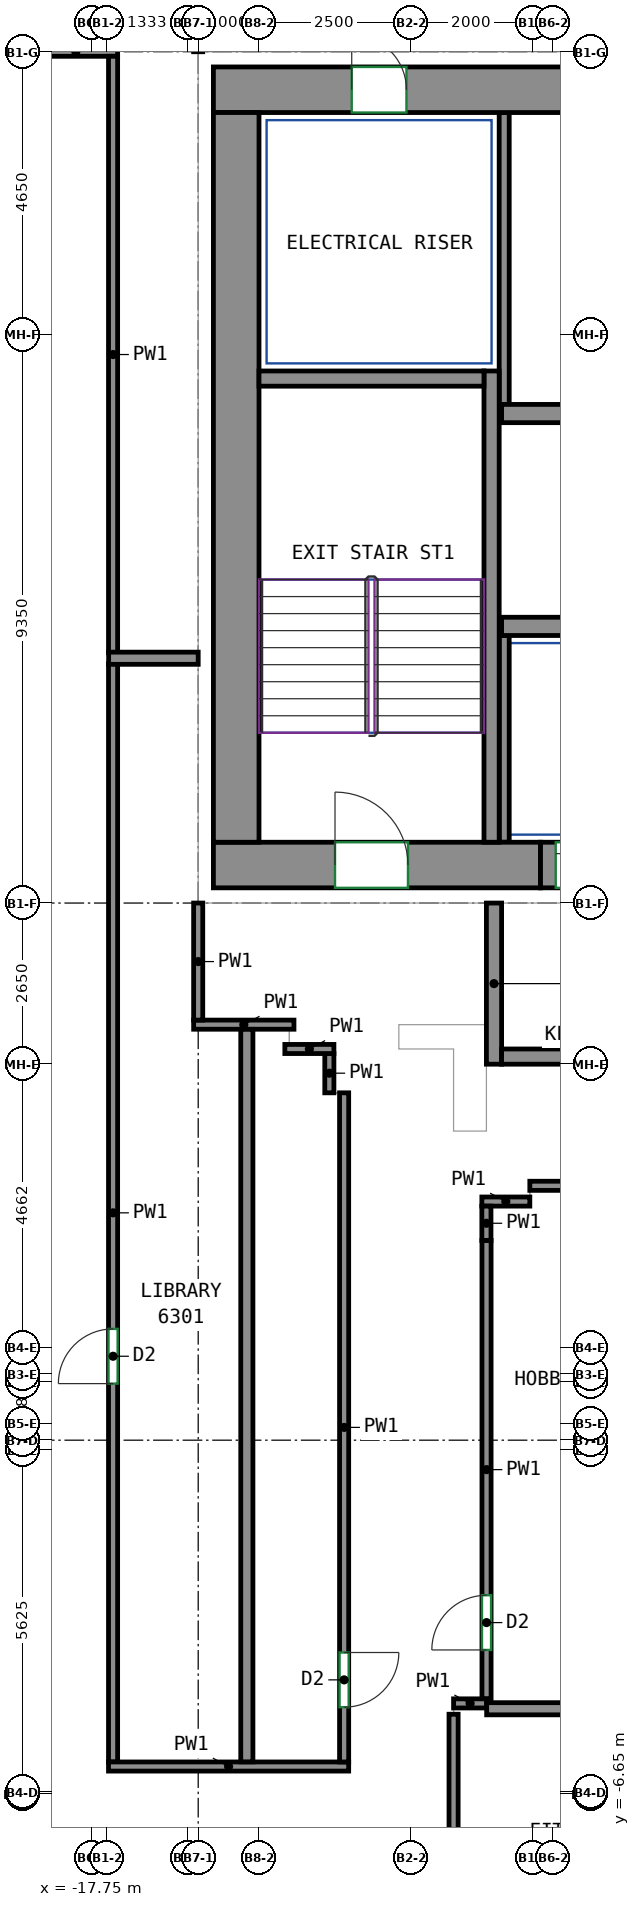
"""IFC4 building model, lengths in metres.
Left out: names, types, materials, properties, quantities, classifications, styles, units other than length and angle.
Written with IfcOpenShell. Run it as: python <this file> out.ifc"""

import sys

from ifc_helpers import new_model, si_unit, direction, frame, frame_2d, origin, place, context, subcontext, project, spatial, rectangle, extrude, source, transform, mapped, element, fill, save


model = new_model("IFC4")
c1 = context("Model", 3, precision=1e-05, world=origin(), true_north=direction((0.0, 1.0)))
c2 = subcontext(c1, "Body", "Model", "MODEL_VIEW")
j1 = project(units=[si_unit("LENGTHUNIT", "METRE"), si_unit("PLANEANGLEUNIT", "RADIAN")], contexts=[c1])
p1 = place(None, origin())
s1 = spatial("IfcSite", under=j1, at=p1, CompositionType="ELEMENT")
p2 = place(p1, origin())
s2 = spatial("IfcBuilding", under=s1, at=p2, CompositionType="ELEMENT")
p3 = place(p2, frame((0.0, 0.0, 259.4)))
s3 = spatial("IfcBuildingStorey", under=s2, at=p3, CompositionType="ELEMENT", Elevation=259.4)
m1 = source(origin(), c2, "Body", "SweptSolid", [
    extrude(rectangle(XDim=5.38, YDim=0.75, at=frame_2d((2.69, 0.0))), origin(), (0.0, 0.0, 1.0), 3.0),
])
p4 = place(p3, frame((-15.75, 8.625, 0.0), z_axis=(0.0, 0.0, 1.0), x_axis=(1.0, 0.0, 0.0)))
e1 = element("IfcWall", 1, at=p4, inside=s3, PredefinedType="SHEAR", context=c2, shape_type="MappedRepresentation", body=[
    mapped(m1, transform((0.0, 0.0, 0.0))),
])
p5 = place(p4, frame((2.0, 0.0, 0.0)))
e2 = element("IfcOpeningElement", 2, at=p5, cuts=e1, PredefinedType="OPENING", context=c2, shape_type="SweptSolid", body=[
    extrude(rectangle(XDim=1.2, YDim=2.1, at=frame_2d((0.6, 1.05))), frame((0.0, 0.385, 0.0), z_axis=(0.0, -1.0, 0.0), x_axis=(1.0, 0.0, 0.0)), (0.0, 0.0, 1.0), 0.77),
])
m2 = source(origin(), c2, "Body", "SweptSolid", [
    extrude(rectangle(XDim=33.6, YDim=0.75, at=frame_2d((16.8, 0.0))), origin(), (0.0, 0.0, 1.0), 3.0),
])
p6 = place(p3, frame((-15.75, 21.375, 0.0), z_axis=(0.0, 0.0, 1.0), x_axis=(1.0, 0.0, 0.0)))
e3 = element("IfcWall", 3, at=p6, inside=s3, PredefinedType="SHEAR", context=c2, shape_type="MappedRepresentation", body=[
    mapped(m2, transform((0.0, 0.0, 0.0))),
])
p7 = place(p6, frame((8.27, 0.0, 0.0)))
e4 = element("IfcOpeningElement", 4, at=p7, cuts=e3, PredefinedType="OPENING", context=c2, shape_type="SweptSolid", body=[
    extrude(rectangle(XDim=0.9, YDim=2.1, at=frame_2d((0.45, 1.05))), frame((0.0, 0.385, 0.0), z_axis=(0.0, -1.0, 0.0), x_axis=(1.0, 0.0, 0.0)), (0.0, 0.0, 1.0), 0.77),
])
p8 = place(p6, frame((14.3, 0.0, 0.0)))
e5 = element("IfcOpeningElement", 5, at=p8, cuts=e3, PredefinedType="OPENING", context=c2, shape_type="SweptSolid", body=[
    extrude(rectangle(XDim=0.9, YDim=2.1, at=frame_2d((0.45, 1.05))), frame((0.0, 0.385, 0.0), z_axis=(0.0, -1.0, 0.0), x_axis=(1.0, 0.0, 0.0)), (0.0, 0.0, 1.0), 0.77),
])
p9 = place(p6, frame((19.124, 0.0, 0.0)))
e6 = element("IfcOpeningElement", 6, at=p9, cuts=e3, PredefinedType="OPENING", context=c2, shape_type="SweptSolid", body=[
    extrude(rectangle(XDim=0.9, YDim=2.1, at=frame_2d((0.45, 1.05))), frame((0.0, 0.385, 0.0), z_axis=(0.0, -1.0, 0.0), x_axis=(1.0, 0.0, 0.0)), (0.0, 0.0, 1.0), 0.77),
])
p10 = place(p6, frame((23.814, 0.0, 0.0)))
e7 = element("IfcOpeningElement", 7, at=p10, cuts=e3, PredefinedType="OPENING", context=c2, shape_type="SweptSolid", body=[
    extrude(rectangle(XDim=0.9, YDim=2.1, at=frame_2d((0.45, 1.05))), frame((0.0, 0.385, 0.0), z_axis=(0.0, -1.0, 0.0), x_axis=(1.0, 0.0, 0.0)), (0.0, 0.0, 1.0), 0.77),
])
p11 = place(p6, frame((27.07, 0.0, 0.0)))
e8 = element("IfcOpeningElement", 8, at=p11, cuts=e3, PredefinedType="OPENING", context=c2, shape_type="SweptSolid", body=[
    extrude(rectangle(XDim=0.9, YDim=2.1, at=frame_2d((0.45, 1.05))), frame((0.0, 0.385, 0.0), z_axis=(0.0, -1.0, 0.0), x_axis=(1.0, 0.0, 0.0)), (0.0, 0.0, 1.0), 0.77),
])
p12 = place(p6, frame((2.275, 0.0, 0.0)))
e9 = element("IfcOpeningElement", 9, at=p12, cuts=e3, PredefinedType="OPENING", context=c2, shape_type="SweptSolid", body=[
    extrude(rectangle(XDim=0.9, YDim=2.1, at=frame_2d((0.45, 1.05))), frame((0.0, 0.385, 0.0), z_axis=(0.0, -1.0, 0.0), x_axis=(1.0, 0.0, 0.0)), (0.0, 0.0, 1.0), 0.77),
])
p13 = place(p6, frame((30.425, 0.0, 0.0)))
e10 = element("IfcOpeningElement", 10, at=p13, cuts=e3, PredefinedType="OPENING", context=c2, shape_type="SweptSolid", body=[
    extrude(rectangle(XDim=0.9, YDim=2.1, at=frame_2d((0.45, 1.05))), frame((0.0, 0.385, 0.0), z_axis=(0.0, -1.0, 0.0), x_axis=(1.0, 0.0, 0.0)), (0.0, 0.0, 1.0), 0.77),
])
m3 = source(origin(), c2, "Body", "SweptSolid", [
    extrude(rectangle(XDim=12.0, YDim=0.75, at=frame_2d((6.0, 0.0))), origin(), (0.0, 0.0, 1.0), 3.0),
])
p14 = place(p3, frame((-15.375, 9.0, 0.0), z_axis=(0.0, 0.0, 1.0), x_axis=(0.0, 1.0, 0.0)))
e11 = element("IfcWall", 11, at=p14, inside=s3, PredefinedType="SHEAR", context=c2, shape_type="MappedRepresentation", body=[
    mapped(m3, transform((0.0, 0.0, 0.0))),
])
m4 = source(origin(), c2, "Body", "SweptSolid", [
    extrude(rectangle(XDim=7.75, YDim=0.25, at=frame_2d((3.875, 0.0))), origin(), (0.0, 0.0, 1.0), 3.0),
])
p15 = place(p3, frame((-11.175, 9.0, 0.0), z_axis=(0.0, 0.0, 1.0), x_axis=(0.0, 1.0, 0.0)))
e12 = element("IfcWall", 12, at=p15, inside=s3, PredefinedType="SHEAR", context=c2, shape_type="MappedRepresentation", body=[
    mapped(m4, transform((0.0, 0.0, 0.0))),
])
m5 = source(origin(), c2, "Body", "SweptSolid", [
    extrude(rectangle(XDim=3.7, YDim=0.25, at=frame_2d((1.85, 0.0))), origin(), (0.0, 0.0, 1.0), 3.0),
])
p16 = place(p3, frame((-15.0, 16.625, 0.0), z_axis=(0.0, 0.0, 1.0), x_axis=(1.0, 0.0, 0.0)))
e13 = element("IfcWall", 13, at=p16, inside=s3, PredefinedType="SHEAR", context=c2, shape_type="MappedRepresentation", body=[
    mapped(m5, transform((0.0, 0.0, 0.0))),
])
m6 = source(origin(), c2, "Body", "SweptSolid", [
    extrude(rectangle(XDim=6.0, YDim=0.3, at=frame_2d((3.0, 0.0))), origin(), (0.0, 0.0, 1.0), 3.0),
])
p17 = place(p3, frame((-11.01, 12.55, 0.0), z_axis=(0.0, 0.0, 1.0), x_axis=(1.0, 0.0, 0.0)))
e14 = element("IfcWall", 14, at=p17, inside=s3, PredefinedType="SHEAR", context=c2, shape_type="MappedRepresentation", body=[
    mapped(m6, transform((0.0, 0.0, 0.0))),
])
m7 = source(origin(), c2, "Body", "SweptSolid", [
    extrude(rectangle(XDim=22.08, YDim=0.3, at=frame_2d((11.04, 0.0))), origin(), (0.0, 0.0, 1.0), 3.0),
])
p18 = place(p3, frame((-11.01, 16.05, 0.0), z_axis=(0.0, 0.0, 1.0), x_axis=(1.0, 0.0, 0.0)))
e15 = element("IfcWall", 15, at=p18, inside=s3, PredefinedType="SHEAR", context=c2, shape_type="MappedRepresentation", body=[
    mapped(m7, transform((0.0, 0.0, 0.0))),
])
m8 = source(origin(), c2, "Body", "SweptSolid", [
    extrude(rectangle(XDim=2.65, YDim=0.25, at=frame_2d((1.325, 0.0))), origin(), (0.0, 0.0, 1.0), 2.45),
])
p19 = place(p3, frame((-11.135, 5.35, 0.0), z_axis=(0.0, 0.0, 1.0), x_axis=(0.0, 1.0, 0.0)))
e16 = element("IfcWall", 16, at=p19, inside=s3, PredefinedType="PARTITIONING", context=c2, shape_type="MappedRepresentation", body=[
    mapped(m8, transform((0.0, 0.0, 0.0))),
])
m9 = source(origin(), c2, "Body", "SweptSolid", [
    extrude(rectangle(XDim=5.36, YDim=0.25, at=frame_2d((2.68, 0.0))), origin(), (0.0, 0.0, 1.0), 3.0),
])
p20 = place(p3, frame((-11.01, 5.475, 0.0), z_axis=(0.0, 0.0, 1.0), x_axis=(1.0, 0.0, 0.0)))
e17 = element("IfcWall", 17, at=p20, inside=s3, PredefinedType="PARTITIONING", context=c2, shape_type="MappedRepresentation", body=[
    mapped(m9, transform((0.0, 0.0, 0.0))),
])
p21 = place(p20, frame((2.28, 0.0, 0.0)))
e18 = element("IfcOpeningElement", 18, at=p21, cuts=e17, PredefinedType="OPENING", context=c2, shape_type="SweptSolid", body=[
    extrude(rectangle(XDim=0.8, YDim=2.0, at=frame_2d((0.4, 1.0))), frame((0.0, 0.135, 0.0), z_axis=(0.0, -1.0, 0.0), x_axis=(1.0, 0.0, 0.0)), (0.0, 0.0, 1.0), 0.27),
])
m10 = source(origin(), c2, "Body", "SweptSolid", [
    extrude(rectangle(XDim=4.8, YDim=0.165, at=frame_2d((2.4, 0.0))), origin(), (0.0, 0.0, 1.0), 3.0),
])
p22 = place(p3, frame((-10.968, 16.2, 0.0), z_axis=(0.0, 0.0, 1.0), x_axis=(0.0, 1.0, 0.0)))
e19 = element("IfcWall", 19, at=p22, inside=s3, PredefinedType="PARTITIONING", context=c2, shape_type="MappedRepresentation", body=[
    mapped(m10, transform((0.0, 0.0, 0.0))),
])
m11 = source(origin(), c2, "Body", "SweptSolid", [
    extrude(rectangle(XDim=3.4, YDim=0.165, at=frame_2d((1.7, 0.0))), origin(), (0.0, 0.0, 1.0), 3.0),
])
p23 = place(p3, frame((-10.968, 9.0, 0.0), z_axis=(0.0, 0.0, 1.0), x_axis=(0.0, 1.0, 0.0)))
e20 = element("IfcWall", 20, at=p23, inside=s3, PredefinedType="PARTITIONING", context=c2, shape_type="MappedRepresentation", body=[
    mapped(m11, transform((0.0, 0.0, 0.0))),
])
m12 = source(origin(), c2, "Body", "SweptSolid", [
    extrude(rectangle(XDim=1.4, YDim=0.75, at=frame_2d((0.7, 0.0))), origin(), (0.0, 0.0, 1.0), 2.7),
])
p24 = place(p3, frame((-10.37, 8.625, 0.0), z_axis=(0.0, 0.0, 1.0), x_axis=(1.0, 0.0, 0.0)))
e21 = element("IfcWall", 21, at=p24, inside=s3, PredefinedType="PARTITIONING", context=c2, shape_type="MappedRepresentation", body=[
    mapped(m12, transform((0.0, 0.0, 0.0))),
])
p25 = place(p24, frame((0.25, 0.0, 0.0)))
e22 = element("IfcOpeningElement", 22, at=p25, cuts=e21, PredefinedType="OPENING", context=c2, shape_type="SweptSolid", body=[
    extrude(rectangle(XDim=0.9, YDim=2.1, at=frame_2d((0.45, 1.05))), frame((0.0, 0.385, 0.0), z_axis=(0.0, -1.0, 0.0), x_axis=(1.0, 0.0, 0.0)), (0.0, 0.0, 1.0), 0.77),
])
p26 = place(p3, frame((-17.4, -6.125, 0.0), z_axis=(0.0, 0.0, 1.0), x_axis=(0.0, 1.0, 0.0)))
e23 = element("IfcWall", 23, at=p26, inside=s3, PredefinedType="PARTITIONING", context=c2, shape_type="SweptSolid", body=[
    extrude(rectangle(XDim=18.061, YDim=0.15, at=frame_2d((9.031, 0.0))), origin(), (0.0, 0.0, 1.0), 3.0),
])
p27 = place(p26, frame((6.222, 0.0, 0.0)))
e24 = element("IfcOpeningElement", 24, at=p27, cuts=e23, PredefinedType="OPENING", context=c2, shape_type="SweptSolid", body=[
    extrude(rectangle(XDim=0.9, YDim=2.1, at=frame_2d((0.45, 1.05))), frame((0.0, 0.085, 0.0), z_axis=(0.0, -1.0, 0.0), x_axis=(1.0, 0.0, 0.0)), (0.0, 0.0, 1.0), 0.17),
])
p28 = place(p3, frame((-17.475, -6.2, 0.0), z_axis=(0.0, 0.0, 1.0), x_axis=(1.0, 0.0, 0.0)))
e25 = element("IfcWall", 25, at=p28, inside=s3, PredefinedType="PARTITIONING", context=c2, shape_type="SweptSolid", body=[
    extrude(rectangle(XDim=3.95, YDim=0.15, at=frame_2d((1.975, 0.0))), origin(), (0.0, 0.0, 1.0), 3.0),
])
p29 = place(p3, frame((-16.075, 6.0, 0.0), z_axis=(0.0, 0.0, 1.0), x_axis=(1.0, 0.0, 0.0)))
e26 = element("IfcWall", 26, at=p29, inside=s3, PredefinedType="PARTITIONING", context=c2, shape_type="SweptSolid", body=[
    extrude(rectangle(XDim=1.65, YDim=0.15, at=frame_2d((0.825, 0.0))), origin(), (0.0, 0.0, 1.0), 3.0),
])
p30 = place(p3, frame((-16.0, 6.075, 0.0), z_axis=(0.0, 0.0, 1.0), x_axis=(0.0, 1.0, 0.0)))
e27 = element("IfcWall", 27, at=p30, inside=s3, PredefinedType="PARTITIONING", context=c2, shape_type="SweptSolid", body=[
    extrude(rectangle(XDim=1.925, YDim=0.15, at=frame_2d((0.962, 0.0))), origin(), (0.0, 0.0, 1.0), 3.0),
])
p31 = place(p3, frame((-17.325, 22.0, 0.0), z_axis=(0.0, 0.0, 1.0), x_axis=(-1.0, 0.0, 0.0)))
e28 = element("IfcWall", 28, at=p31, inside=s3, PredefinedType="PARTITIONING", context=c2, shape_type="SweptSolid", body=[
    extrude(rectangle(XDim=1.375, YDim=0.15, at=frame_2d((0.688, 0.0))), origin(), (0.0, 0.0, 1.0), 2.45),
])
p32 = place(p3, frame((-17.4, 12.116, 0.0), z_axis=(0.0, 0.0, 1.0), x_axis=(0.0, 1.0, 0.0)))
e29 = element("IfcWall", 29, at=p32, inside=s3, PredefinedType="PARTITIONING", context=c2, shape_type="SweptSolid", body=[
    extrude(rectangle(XDim=9.809, YDim=0.15, at=frame_2d((4.905, 0.0))), origin(), (0.0, 0.0, 1.0), 3.0),
])
p33 = place(p3, frame((-13.6, 4.879, 0.0), z_axis=(0.0, 0.0, 1.0), x_axis=(0.0, -1.0, 0.0)))
e30 = element("IfcWall", 30, at=p33, inside=s3, PredefinedType="PARTITIONING", context=c2, shape_type="SweptSolid", body=[
    extrude(rectangle(XDim=11.004, YDim=0.15, at=frame_2d((5.502, 0.0))), origin(), (0.0, 0.0, 1.0), 3.0),
])
p34 = place(p33, frame((9.204, 0.0, 0.0)))
e31 = element("IfcOpeningElement", 31, at=p34, cuts=e30, PredefinedType="OPENING", context=c2, shape_type="SweptSolid", body=[
    extrude(rectangle(XDim=0.9, YDim=2.1, at=frame_2d((0.45, 1.05))), frame((0.0, 0.085, 0.0), z_axis=(0.0, -1.0, 0.0), x_axis=(1.0, 0.0, 0.0)), (0.0, 0.0, 1.0), 0.17),
])
p35 = place(p3, frame((-13.843, 5.525, 0.0), z_axis=(0.0, 0.0, 1.0), x_axis=(0.0, -1.0, 0.0)))
e32 = element("IfcWall", 32, at=p35, inside=s3, PredefinedType="PARTITIONING", context=c2, shape_type="SweptSolid", body=[
    extrude(rectangle(XDim=0.646, YDim=0.15, at=frame_2d((0.323, 0.0))), origin(), (0.0, 0.0, 1.0), 3.0),
])
p36 = place(p3, frame((-14.575, 5.6, 0.0), z_axis=(0.0, 0.0, 1.0), x_axis=(1.0, 0.0, 0.0)))
e33 = element("IfcWall", 33, at=p36, inside=s3, PredefinedType="PARTITIONING", context=c2, shape_type="SweptSolid", body=[
    extrude(rectangle(XDim=0.807, YDim=0.15, at=frame_2d((0.403, 0.0))), origin(), (0.0, 0.0, 1.0), 3.0),
])
p37 = place(p3, frame((-11.258, -5.087, 0.0), z_axis=(0.0, 0.0, 1.0), x_axis=(0.0, 1.0, 0.0)))
e34 = element("IfcWall", 34, at=p37, inside=s3, PredefinedType="PARTITIONING", context=c2, shape_type="SweptSolid", body=[
    extrude(rectangle(XDim=7.539, YDim=0.15, at=frame_2d((3.77, 0.0))), origin(), (0.0, 0.0, 1.0), 3.0),
])
p38 = place(p37, frame((0.804, 0.0, 0.0)))
e35 = element("IfcOpeningElement", 35, at=p38, cuts=e34, PredefinedType="OPENING", context=c2, shape_type="SweptSolid", body=[
    extrude(rectangle(XDim=0.9, YDim=2.1, at=frame_2d((0.45, 1.05))), frame((0.0, 0.085, 0.0), z_axis=(0.0, -1.0, 0.0), x_axis=(1.0, 0.0, 0.0)), (0.0, 0.0, 1.0), 0.17),
])
p39 = place(p3, frame((-11.8, -5.162, 0.0), z_axis=(0.0, 0.0, 1.0), x_axis=(1.0, 0.0, 0.0)))
e36 = element("IfcWall", 36, at=p39, inside=s3, PredefinedType="PARTITIONING", context=c2, shape_type="SweptSolid", body=[
    extrude(rectangle(XDim=0.544, YDim=0.15, at=frame_2d((0.272, 0.0))), origin(), (0.0, 0.0, 1.0), 3.0),
])
p40 = place(p3, frame((-10.546, 3.35, 0.0), z_axis=(0.0, 0.0, 1.0), x_axis=(1.0, 0.0, 0.0)))
e37 = element("IfcWall", 37, at=p40, inside=s3, PredefinedType="PARTITIONING", context=c2, shape_type="SweptSolid", body=[
    extrude(rectangle(XDim=3.896, YDim=0.15, at=frame_2d((1.948, 0.0))), origin(), (0.0, 0.0, 1.0), 3.0),
])
p41 = place(p3, frame((-11.335, 3.091, 0.0), z_axis=(0.0, 0.0, 1.0), x_axis=(1.0, 0.0, 0.0)))
e38 = element("IfcWall", 38, at=p41, inside=s3, PredefinedType="PARTITIONING", context=c2, shape_type="SweptSolid", body=[
    extrude(rectangle(XDim=0.789, YDim=0.15, at=frame_2d((0.395, 0.0))), origin(), (0.0, 0.0, 1.0), 3.0),
])
p42 = place(p3, frame((-11.26, 2.452, 0.0), z_axis=(0.0, 0.0, 1.0), x_axis=(0.0, 1.0, 0.0)))
e39 = element("IfcWall", 39, at=p42, inside=s3, PredefinedType="PARTITIONING", context=c2, shape_type="SweptSolid", body=[
    extrude(rectangle(XDim=0.564, YDim=0.15, at=frame_2d((0.282, 0.0))), origin(), (0.0, 0.0, 1.0), 3.0),
])
p43 = place(p3, frame((-11.8, -10.125, 0.0), z_axis=(0.0, 0.0, 1.0), x_axis=(0.0, 1.0, 0.0)))
e40 = element("IfcWall", 40, at=p43, inside=s3, PredefinedType="PARTITIONING", context=c2, shape_type="SweptSolid", body=[
    extrude(rectangle(XDim=4.785, YDim=0.15, at=frame_2d((2.393, 0.0))), origin(), (0.0, 0.0, 1.0), 3.0),
])
p44 = place(p43, frame((0.713, 0.0, 0.0)))
e41 = element("IfcOpeningElement", 41, at=p44, cuts=e40, PredefinedType="OPENING", context=c2, shape_type="SweptSolid", body=[
    extrude(rectangle(XDim=0.9, YDim=2.1, at=frame_2d((0.45, 1.05))), frame((0.0, 0.085, 0.0), z_axis=(0.0, -1.0, 0.0), x_axis=(1.0, 0.0, 0.0)), (0.0, 0.0, 1.0), 0.17),
])
p45 = place(p3, frame((-16.0, 12.026, 0.0), z_axis=(0.0, 0.0, 1.0), x_axis=(-1.0, 0.0, 0.0)))
e42 = element("IfcWall", 42, at=p45, inside=s3, PredefinedType="PARTITIONING", context=c2, shape_type="SweptSolid", body=[
    extrude(rectangle(XDim=1.473, YDim=0.2, at=frame_2d((0.736, 0.0))), origin(), (0.0, 0.0, 1.0), 3.0),
])
p46 = place(p3, frame((-15.2, -6.123, 0.0), z_axis=(0.0, 0.0, 1.0), x_axis=(0.0, 1.0, 0.0)))
e43 = element("IfcWall", 43, at=p46, inside=s3, PredefinedType="PARTITIONING", context=c2, shape_type="SweptSolid", body=[
    extrude(rectangle(XDim=12.046, YDim=0.2, at=frame_2d((6.023, 0.0))), origin(), (0.0, 0.0, 1.0), 3.0),
])
p47 = place(p3, frame((-11.256, -5.25, 0.0), z_axis=(0.0, 0.0, 1.0), x_axis=(1.0, 0.0, 0.0)))
e44 = element("IfcWall", 44, at=p47, inside=s3, PredefinedType="PARTITIONING", context=c2, shape_type="SweptSolid", body=[
    extrude(rectangle(XDim=2.356, YDim=0.2, at=frame_2d((1.178, 0.0))), origin(), (0.0, 0.0, 1.0), 3.0),
])
p48 = place(p25, origin())
e45 = element("IfcDoor", 45, at=p48, inside=s3, OperationType="SLIDING_TO_LEFT", PredefinedType="DOOR", context=c2, shape_type="SweptSolid", body=[
    extrude(rectangle(XDim=0.9, YDim=2.1, at=frame_2d((0.45, 1.05))), frame((0.0, 0.28, 0.0), z_axis=(0.0, -1.0, 0.0), x_axis=(1.0, 0.0, 0.0)), (0.0, 0.0, 1.0), 0.05),
])
fill(e22, e45)
p49 = place(p12, origin())
e46 = element("IfcDoor", 46, at=p49, inside=s3, OperationType="SINGLE_SWING_LEFT", PredefinedType="DOOR", context=c2, shape_type="SweptSolid", body=[
    extrude(rectangle(XDim=0.9, YDim=2.1, at=frame_2d((0.45, 1.05))), frame((0.0, -0.23, 0.0), z_axis=(0.0, -1.0, 0.0), x_axis=(1.0, 0.0, 0.0)), (0.0, 0.0, 1.0), 0.05),
])
fill(e9, e46)
p50 = place(p5, origin())
e47 = element("IfcDoor", 47, at=p50, inside=s3, OperationType="DOUBLE_DOOR_SINGLE_SWING", PredefinedType="DOOR", context=c2, shape_type="SweptSolid", body=[
    extrude(rectangle(XDim=1.2, YDim=2.1, at=frame_2d((0.6, 1.05))), frame((0.0, 0.28, 0.0), z_axis=(0.0, -1.0, 0.0), x_axis=(1.0, 0.0, 0.0)), (0.0, 0.0, 1.0), 0.05),
])
fill(e2, e47)
p51 = place(p34, origin())
e48 = element("IfcDoor", 48, at=p51, inside=s3, OperationType="SINGLE_SWING_LEFT", PredefinedType="DOOR", context=c2, shape_type="SweptSolid", body=[
    extrude(rectangle(XDim=0.9, YDim=2.1, at=frame_2d((0.45, 1.05))), frame((0.0, 0.025, 0.0), z_axis=(0.0, -1.0, 0.0), x_axis=(1.0, 0.0, 0.0)), (0.0, 0.0, 1.0), 0.05),
])
fill(e31, e48)
p52 = place(p38, origin())
e49 = element("IfcDoor", 49, at=p52, inside=s3, OperationType="SINGLE_SWING_LEFT", PredefinedType="DOOR", context=c2, shape_type="SweptSolid", body=[
    extrude(rectangle(XDim=0.9, YDim=2.1, at=frame_2d((0.45, 1.05))), frame((0.0, 0.025, 0.0), z_axis=(0.0, -1.0, 0.0), x_axis=(1.0, 0.0, 0.0)), (0.0, 0.0, 1.0), 0.05),
])
fill(e35, e49)
p53 = place(p27, origin())
e50 = element("IfcDoor", 50, at=p53, inside=s3, OperationType="SINGLE_SWING_LEFT", PredefinedType="DOOR", context=c2, shape_type="SweptSolid", body=[
    extrude(rectangle(XDim=0.9, YDim=2.1, at=frame_2d((0.45, 1.05))), frame((0.0, 0.025, 0.0), z_axis=(0.0, -1.0, 0.0), x_axis=(1.0, 0.0, 0.0)), (0.0, 0.0, 1.0), 0.05),
])
fill(e24, e50)
save(model, sys.argv[1])
